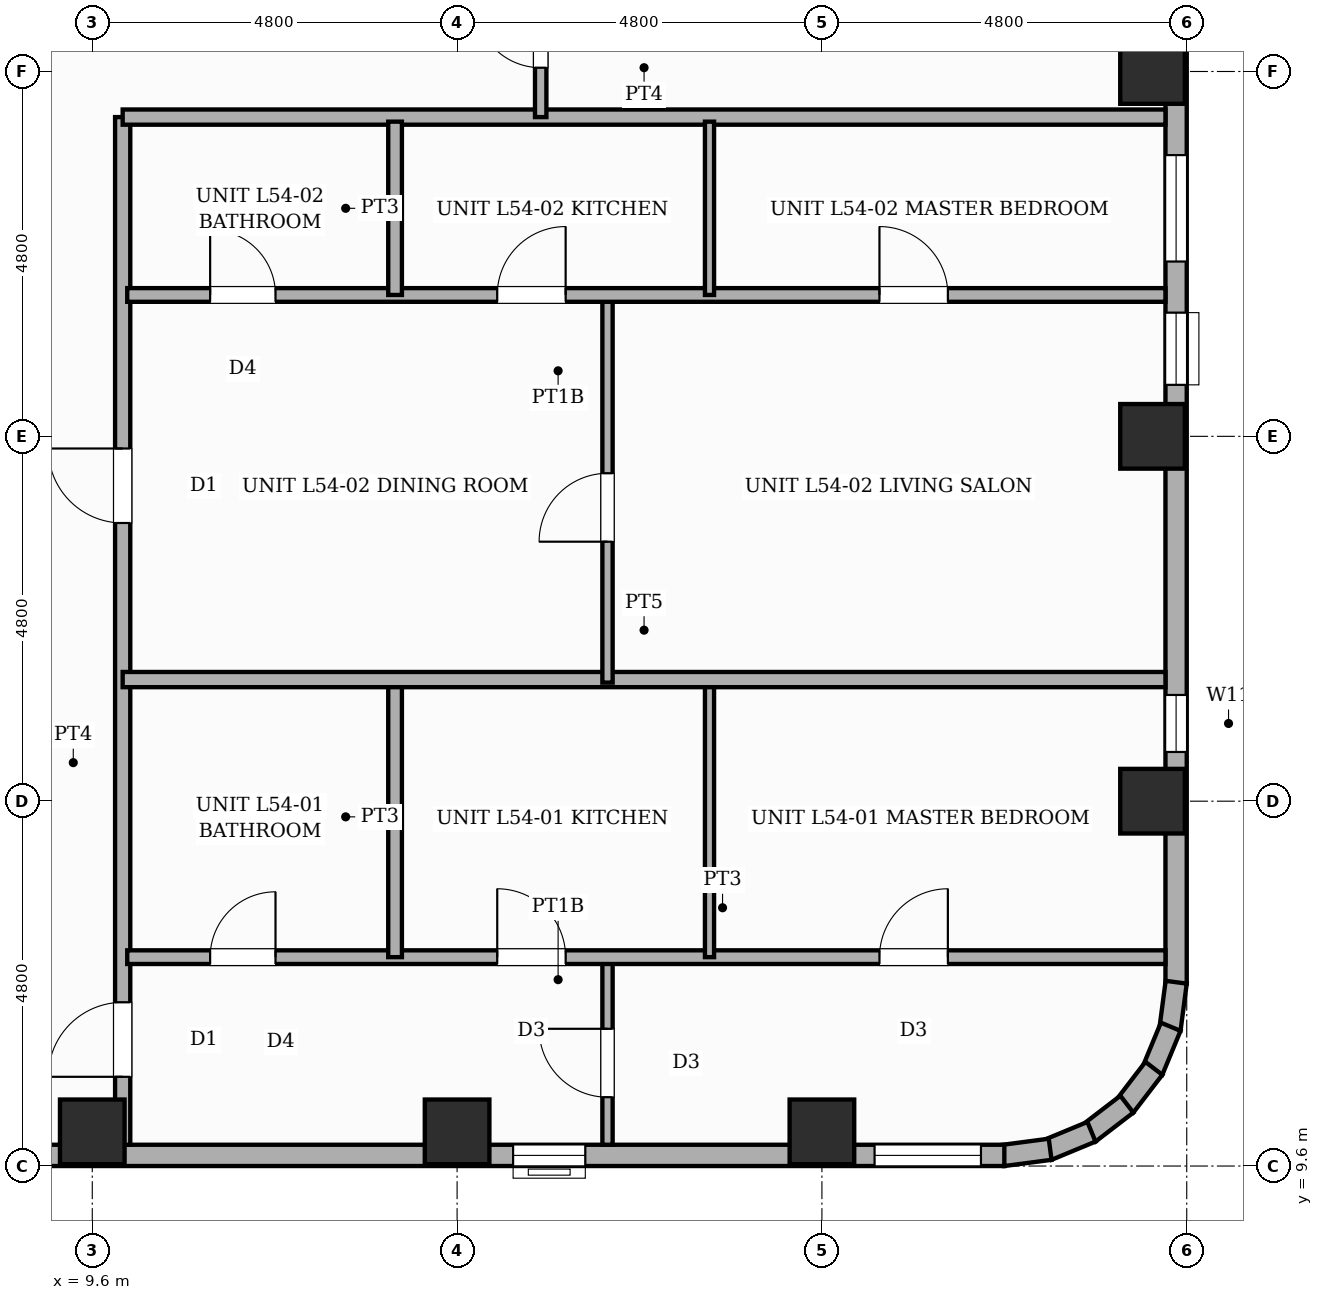
"""IFC4 building model, lengths in metres.
Left out: names, types, materials, properties, quantities, classifications, styles, units other than length and angle.
Written with IfcOpenShell. Run it as: python <this file> out.ifc"""

import sys

from ifc_helpers import new_model, si_unit, direction, frame, frame_2d, origin, origin_2d, place, context, subcontext, project, spatial, rectangle, extrude, element, fill, save


model = new_model("IFC4")
c1 = context("Model", 3, precision=1e-05, world=origin(), true_north=direction((0.0, 1.0)))
c2 = subcontext(c1, "Body", "Model", "MODEL_VIEW")
j1 = project(units=[si_unit("LENGTHUNIT", "METRE"), si_unit("PLANEANGLEUNIT", "RADIAN")], contexts=[c1])
p1 = place(None, origin())
s1 = spatial("IfcSite", under=j1, at=p1, CompositionType="ELEMENT")
p2 = place(p1, origin())
s2 = spatial("IfcBuilding", under=s1, at=p2, CompositionType="ELEMENT")
p3 = place(p2, frame((0.0, 0.0, 207.4)))
s3 = spatial("IfcBuildingStorey", under=s2, at=p3, CompositionType="ELEMENT", Elevation=207.4)
for number, where, z_axis, x_axis in (
    (1, (9.6, 10.05, 0.0), (0.0, 0.0, 1.0), (1.0, 0.0, 0.0)),
    (2, (14.4, 10.05, 0.0), (0.0, 0.0, 1.0), (1.0, 0.0, 0.0)),
    (3, (19.2, 10.05, 0.0), (0.0, 0.0, 1.0), (1.0, 0.0, 0.0)),
    (4, (23.55, 14.4, 0.0), (0.0, 0.0, 1.0), (1.0, 0.0, 0.0)),
    (5, (23.55, 19.2, 0.0), (0.0, 0.0, 1.0), (1.0, 0.0, 0.0)),
    (6, (23.55, 24.0, 0.0), (0.0, 0.0, 1.0), (1.0, 0.0, 0.0)),
):
    element("IfcColumn", number, at=place(p3, frame(where, z_axis=z_axis, x_axis=x_axis)), inside=s3, PredefinedType="COLUMN", context=c2, shape_type="SweptSolid", body=[
        extrude(rectangle(XDim=0.85, YDim=0.85, at=origin_2d()), origin(), (0.0, 0.0, 1.0), 3.6),
    ])
p4 = place(p3, frame((23.86, 26.4, 0.0), z_axis=(0.0, 0.0, 1.0), x_axis=(0.0, -1.0, 0.0)))
e7 = element("IfcWall", 7, at=p4, inside=s3, PredefinedType="STANDARD", context=c2, shape_type="SweptSolid", body=[
    extrude(rectangle(XDim=14.4, YDim=0.28, at=frame_2d((7.2, 0.0))), origin(), (0.0, 0.0, 1.0), 2.66),
])
p5 = place(p4, frame((10.603, 0.0, 0.45)))
e8 = element("IfcOpeningElement", 8, at=p5, cuts=e7, PredefinedType="OPENING", context=c2, shape_type="SweptSolid", body=[
    extrude(rectangle(XDim=0.75, YDim=1.8, at=frame_2d((0.375, 0.9))), frame((0.0, 0.15, 0.0), z_axis=(0.0, -1.0, 0.0), x_axis=(1.0, 0.0, 0.0)), (0.0, 0.0, 1.0), 0.3),
])
p6 = place(p4, frame((3.5, 0.0, 0.65)))
e9 = element("IfcOpeningElement", 9, at=p6, cuts=e7, PredefinedType="OPENING", context=c2, shape_type="SweptSolid", body=[
    extrude(rectangle(XDim=1.4, YDim=1.1, at=frame_2d((0.7, 0.55))), frame((0.0, 0.15, 0.0), z_axis=(0.0, -1.0, 0.0), x_axis=(1.0, 0.0, 0.0)), (0.0, 0.0, 1.0), 0.3),
])
p7 = place(p4, frame((5.573, 0.0, 0.45)))
e10 = element("IfcOpeningElement", 10, at=p7, cuts=e7, PredefinedType="OPENING", context=c2, shape_type="SweptSolid", body=[
    extrude(rectangle(XDim=0.95, YDim=1.8, at=frame_2d((0.475, 0.9))), frame((0.0, 0.15, 0.0), z_axis=(0.0, -1.0, 0.0), x_axis=(1.0, 0.0, 0.0)), (0.0, 0.0, 1.0), 0.3),
])
p8 = place(p4, frame((0.933, 0.0, 0.45)))
e11 = element("IfcOpeningElement", 11, at=p8, cuts=e7, PredefinedType="OPENING", context=c2, shape_type="SweptSolid", body=[
    extrude(rectangle(XDim=0.75, YDim=1.8, at=frame_2d((0.375, 0.9))), frame((0.0, 0.15, 0.0), z_axis=(0.0, -1.0, 0.0), x_axis=(1.0, 0.0, 0.0)), (0.0, 0.0, 1.0), 0.3),
])
for number, where, z_axis, x_axis in (
    (12, (23.861, 12.018, 0.0), (0.0, 0.0, 1.0), (-0.131, -0.991, 0.0)),
    (13, (23.789, 11.432, 0.0), (0.0, 0.0, 1.0), (-0.382, -0.924, 0.0)),
    (14, (23.567, 10.885, 0.0), (0.0, 0.0, 1.0), (-0.609, -0.793, 0.0)),
    (15, (23.212, 10.414, 0.0), (0.0, 0.0, 1.0), (-0.793, -0.609, 0.0)),
    (16, (22.746, 10.051, 0.0), (0.0, 0.0, 1.0), (-0.924, -0.383, 0.0)),
    (17, (22.203, 9.821, 0.0), (0.0, 0.0, 1.0), (-0.991, -0.131, 0.0)),
):
    element("IfcWall", number, at=place(p3, frame(where, z_axis=z_axis, x_axis=x_axis)), inside=s3, PredefinedType="STANDARD", context=c2, shape_type="SweptSolid", body=[
        extrude(rectangle(XDim=0.626, YDim=0.28, at=frame_2d((0.313, 0.0))), origin(), (0.0, 0.0, 1.0), 3.38),
    ])
p9 = place(p3, frame((21.6, 9.74, 0.0), z_axis=(0.0, 0.0, 1.0), x_axis=(-1.0, 0.0, 0.0)))
e18 = element("IfcWall", 18, at=p9, inside=s3, PredefinedType="STANDARD", context=c2, shape_type="SweptSolid", body=[
    extrude(rectangle(XDim=14.4, YDim=0.28, at=frame_2d((7.2, 0.0))), origin(), (0.0, 0.0, 1.0), 2.66),
])
p10 = place(p9, frame((12.647, 0.0, 0.45)))
e19 = element("IfcOpeningElement", 19, at=p10, cuts=e18, PredefinedType="OPENING", context=c2, shape_type="SweptSolid", body=[
    extrude(rectangle(XDim=0.6, YDim=1.8, at=frame_2d((0.3, 0.9))), frame((0.0, 0.15, 0.0), z_axis=(0.0, -1.0, 0.0), x_axis=(1.0, 0.0, 0.0)), (0.0, 0.0, 1.0), 0.3),
])
p11 = place(p9, frame((5.513, 0.0, 0.45)))
e20 = element("IfcOpeningElement", 20, at=p11, cuts=e18, PredefinedType="OPENING", context=c2, shape_type="SweptSolid", body=[
    extrude(rectangle(XDim=0.95, YDim=1.8, at=frame_2d((0.475, 0.9))), frame((0.0, 0.15, 0.0), z_axis=(0.0, -1.0, 0.0), x_axis=(1.0, 0.0, 0.0)), (0.0, 0.0, 1.0), 0.3),
])
p12 = place(p9, frame((0.308, 0.0, 0.65)))
e21 = element("IfcOpeningElement", 21, at=p12, cuts=e18, PredefinedType="OPENING", context=c2, shape_type="SweptSolid", body=[
    extrude(rectangle(XDim=1.4, YDim=1.1, at=frame_2d((0.7, 0.55))), frame((0.0, 0.15, 0.0), z_axis=(0.0, -1.0, 0.0), x_axis=(1.0, 0.0, 0.0)), (0.0, 0.0, 1.0), 0.3),
])
p13 = place(p3, frame((10.0, 9.88, 0.0), z_axis=(0.0, 0.0, 1.0), x_axis=(0.0, 1.0, 0.0)))
e22 = element("IfcWall", 22, at=p13, inside=s3, PredefinedType="PARTITIONING", context=c2, shape_type="SweptSolid", body=[
    extrude(rectangle(XDim=13.52, YDim=0.2, at=frame_2d((6.76, 0.0))), origin(), (0.0, 0.0, 1.0), 3.38),
])
p14 = place(p13, frame((0.894, 0.0, 0.0)))
e23 = element("IfcOpeningElement", 23, at=p14, cuts=e22, PredefinedType="OPENING", context=c2, shape_type="SweptSolid", body=[
    extrude(rectangle(XDim=0.98, YDim=2.18, at=frame_2d((0.49, 1.09))), frame((0.0, 0.11, 0.0), z_axis=(0.0, -1.0, 0.0), x_axis=(1.0, 0.0, 0.0)), (0.0, 0.0, 1.0), 0.22),
])
p15 = place(p13, frame((8.18, 0.0, 0.0)))
e24 = element("IfcOpeningElement", 24, at=p15, cuts=e22, PredefinedType="OPENING", context=c2, shape_type="SweptSolid", body=[
    extrude(rectangle(XDim=0.98, YDim=2.18, at=frame_2d((0.49, 1.09))), frame((0.0, 0.11, 0.0), z_axis=(0.0, -1.0, 0.0), x_axis=(1.0, 0.0, 0.0)), (0.0, 0.0, 1.0), 0.22),
])
p16 = place(p3, frame((10.0, 23.4, 0.0), z_axis=(0.0, 0.0, 1.0), x_axis=(1.0, 0.0, 0.0)))
e25 = element("IfcWall", 25, at=p16, inside=s3, PredefinedType="PARTITIONING", context=c2, shape_type="SweptSolid", body=[
    extrude(rectangle(XDim=13.72, YDim=0.2, at=frame_2d((6.86, 0.0))), origin(), (0.0, 0.0, 1.0), 3.38),
])
p17 = place(p3, frame((15.5, 23.4, 0.0), z_axis=(0.0, 0.0, 1.0), x_axis=(0.0, 1.0, 0.0)))
e26 = element("IfcWall", 26, at=p17, inside=s3, PredefinedType="PARTITIONING", context=c2, shape_type="SweptSolid", body=[
    extrude(rectangle(XDim=2.35, YDim=0.15, at=frame_2d((1.175, 0.0))), origin(), (0.0, 0.0, 1.0), 3.38),
])
p18 = place(p17, frame((0.65, 0.0, 0.0)))
e27 = element("IfcOpeningElement", 27, at=p18, cuts=e26, PredefinedType="OPENING", context=c2, shape_type="SweptSolid", body=[
    extrude(rectangle(XDim=0.86, YDim=2.1, at=frame_2d((0.43, 1.05))), frame((0.0, 0.085, 0.0), z_axis=(0.0, -1.0, 0.0), x_axis=(1.0, 0.0, 0.0)), (0.0, 0.0, 1.0), 0.17),
])
p19 = place(p3, frame((16.379, 9.88, 0.0), z_axis=(0.0, 0.0, 1.0), x_axis=(0.0, 1.0, 0.0)))
e28 = element("IfcWall", 28, at=p19, inside=s3, PredefinedType="PARTITIONING", context=c2, shape_type="SweptSolid", body=[
    extrude(rectangle(XDim=2.468, YDim=0.135, at=frame_2d((1.234, 0.0))), origin(), (0.0, 0.0, 1.0), 3.38),
])
p20 = place(p19, frame((0.625, 0.0, 0.0)))
e29 = element("IfcOpeningElement", 29, at=p20, cuts=e28, PredefinedType="OPENING", context=c2, shape_type="SweptSolid", body=[
    extrude(rectangle(XDim=0.9, YDim=2.15, at=frame_2d((0.45, 1.075))), frame((0.0, 0.078, 0.0), z_axis=(0.0, -1.0, 0.0), x_axis=(1.0, 0.0, 0.0)), (0.0, 0.0, 1.0), 0.155),
])
p21 = place(p3, frame((10.06, 12.348, 0.0), z_axis=(0.0, 0.0, 1.0), x_axis=(1.0, 0.0, 0.0)))
e30 = element("IfcWall", 30, at=p21, inside=s3, PredefinedType="PLUMBINGWALL", context=c2, shape_type="SweptSolid", body=[
    extrude(rectangle(XDim=13.66, YDim=0.18, at=frame_2d((6.83, 0.0))), origin(), (0.0, 0.0, 1.0), 3.38),
])
p22 = place(p21, frame((1.091, 0.0, 0.0)))
e31 = element("IfcOpeningElement", 31, at=p22, cuts=e30, PredefinedType="OPENING", context=c2, shape_type="SweptSolid", body=[
    extrude(rectangle(XDim=0.86, YDim=2.1, at=frame_2d((0.43, 1.05))), frame((0.0, 0.1, 0.0), z_axis=(0.0, -1.0, 0.0), x_axis=(1.0, 0.0, 0.0)), (0.0, 0.0, 1.0), 0.2),
])
p23 = place(p21, frame((4.868, 0.0, 0.0)))
e32 = element("IfcOpeningElement", 32, at=p23, cuts=e30, PredefinedType="OPENING", context=c2, shape_type="SweptSolid", body=[
    extrude(rectangle(XDim=0.9, YDim=2.15, at=frame_2d((0.45, 1.075))), frame((0.0, 0.1, 0.0), z_axis=(0.0, -1.0, 0.0), x_axis=(1.0, 0.0, 0.0)), (0.0, 0.0, 1.0), 0.2),
])
p24 = place(p21, frame((9.897, 0.0, 0.0)))
e33 = element("IfcOpeningElement", 33, at=p24, cuts=e30, PredefinedType="OPENING", context=c2, shape_type="SweptSolid", body=[
    extrude(rectangle(XDim=0.9, YDim=2.15, at=frame_2d((0.45, 1.075))), frame((0.0, 0.1, 0.0), z_axis=(0.0, -1.0, 0.0), x_axis=(1.0, 0.0, 0.0)), (0.0, 0.0, 1.0), 0.2),
])
p25 = place(p3, frame((13.584, 12.348, 0.0), z_axis=(0.0, 0.0, 1.0), x_axis=(0.0, 1.0, 0.0)))
e34 = element("IfcWall", 34, at=p25, inside=s3, PredefinedType="PLUMBINGWALL", context=c2, shape_type="SweptSolid", body=[
    extrude(rectangle(XDim=3.692, YDim=0.18, at=frame_2d((1.846, 0.0))), origin(), (0.0, 0.0, 1.0), 3.38),
])
p26 = place(p3, frame((17.721, 12.348, 0.0), z_axis=(0.0, 0.0, 1.0), x_axis=(0.0, 1.0, 0.0)))
e35 = element("IfcWall", 35, at=p26, inside=s3, PredefinedType="PARTITIONING", context=c2, shape_type="SweptSolid", body=[
    extrude(rectangle(XDim=3.692, YDim=0.12, at=frame_2d((1.846, 0.0))), origin(), (0.0, 0.0, 1.0), 3.38),
])
p27 = place(p3, frame((10.0, 16.0, 0.0), z_axis=(0.0, 0.0, 1.0), x_axis=(1.0, 0.0, 0.0)))
e36 = element("IfcWall", 36, at=p27, inside=s3, PredefinedType="SOLIDWALL", context=c2, shape_type="SweptSolid", body=[
    extrude(rectangle(XDim=13.72, YDim=0.2, at=frame_2d((6.86, 0.0))), origin(), (0.0, 0.0, 1.0), 3.38),
])
p28 = place(p3, frame((16.379, 15.96, 0.0), z_axis=(0.0, 0.0, 1.0), x_axis=(0.0, 1.0, 0.0)))
e37 = element("IfcWall", 37, at=p28, inside=s3, PredefinedType="PARTITIONING", context=c2, shape_type="SweptSolid", body=[
    extrude(rectangle(XDim=5.1, YDim=0.135, at=frame_2d((2.55, 0.0))), origin(), (0.0, 0.0, 1.0), 3.38),
])
p29 = place(p28, frame((1.854, 0.0, 0.0)))
e38 = element("IfcOpeningElement", 38, at=p29, cuts=e37, PredefinedType="OPENING", context=c2, shape_type="SweptSolid", body=[
    extrude(rectangle(XDim=0.9, YDim=2.15, at=frame_2d((0.45, 1.075))), frame((0.0, 0.078, 0.0), z_axis=(0.0, -1.0, 0.0), x_axis=(1.0, 0.0, 0.0)), (0.0, 0.0, 1.0), 0.155),
])
p30 = place(p3, frame((10.06, 21.06, 0.0), z_axis=(0.0, 0.0, 1.0), x_axis=(1.0, 0.0, 0.0)))
e39 = element("IfcWall", 39, at=p30, inside=s3, PredefinedType="PLUMBINGWALL", context=c2, shape_type="SweptSolid", body=[
    extrude(rectangle(XDim=13.66, YDim=0.18, at=frame_2d((6.83, 0.0))), origin(), (0.0, 0.0, 1.0), 3.38),
])
p31 = place(p30, frame((1.091, 0.0, 0.0)))
e40 = element("IfcOpeningElement", 40, at=p31, cuts=e39, PredefinedType="OPENING", context=c2, shape_type="SweptSolid", body=[
    extrude(rectangle(XDim=0.86, YDim=2.1, at=frame_2d((0.43, 1.05))), frame((0.0, 0.1, 0.0), z_axis=(0.0, -1.0, 0.0), x_axis=(1.0, 0.0, 0.0)), (0.0, 0.0, 1.0), 0.2),
])
p32 = place(p30, frame((4.868, 0.0, 0.0)))
e41 = element("IfcOpeningElement", 41, at=p32, cuts=e39, PredefinedType="OPENING", context=c2, shape_type="SweptSolid", body=[
    extrude(rectangle(XDim=0.9, YDim=2.15, at=frame_2d((0.45, 1.075))), frame((0.0, 0.1, 0.0), z_axis=(0.0, -1.0, 0.0), x_axis=(1.0, 0.0, 0.0)), (0.0, 0.0, 1.0), 0.2),
])
p33 = place(p30, frame((9.897, 0.0, 0.0)))
e42 = element("IfcOpeningElement", 42, at=p33, cuts=e39, PredefinedType="OPENING", context=c2, shape_type="SweptSolid", body=[
    extrude(rectangle(XDim=0.9, YDim=2.15, at=frame_2d((0.45, 1.075))), frame((0.0, 0.1, 0.0), z_axis=(0.0, -1.0, 0.0), x_axis=(1.0, 0.0, 0.0)), (0.0, 0.0, 1.0), 0.2),
])
p34 = place(p3, frame((13.584, 21.06, 0.0), z_axis=(0.0, 0.0, 1.0), x_axis=(0.0, 1.0, 0.0)))
e43 = element("IfcWall", 43, at=p34, inside=s3, PredefinedType="PLUMBINGWALL", context=c2, shape_type="SweptSolid", body=[
    extrude(rectangle(XDim=2.28, YDim=0.18, at=frame_2d((1.14, 0.0))), origin(), (0.0, 0.0, 1.0), 3.38),
])
p35 = place(p3, frame((17.721, 21.06, 0.0), z_axis=(0.0, 0.0, 1.0), x_axis=(0.0, 1.0, 0.0)))
e44 = element("IfcWall", 44, at=p35, inside=s3, PredefinedType="PARTITIONING", context=c2, shape_type="SweptSolid", body=[
    extrude(rectangle(XDim=2.28, YDim=0.12, at=frame_2d((1.14, 0.0))), origin(), (0.0, 0.0, 1.0), 3.38),
])
p36 = place(p5, origin())
e45 = element("IfcWindow", 45, at=p36, inside=s3, PartitioningType="SINGLE_PANEL", PredefinedType="WINDOW", context=c2, shape_type="SweptSolid", body=[
    extrude(rectangle(XDim=0.75, YDim=1.8, at=frame_2d((0.375, 0.9))), frame((0.0, 0.03, 0.0), z_axis=(0.0, -1.0, 0.0), x_axis=(1.0, 0.0, 0.0)), (0.0, 0.0, 1.0), 0.06),
])
fill(e8, e45)
p37 = place(p6, origin())
e46 = element("IfcWindow", 46, at=p37, inside=s3, PartitioningType="SINGLE_PANEL", PredefinedType="WINDOW", context=c2, shape_type="SweptSolid", body=[
    extrude(rectangle(XDim=1.4, YDim=1.1, at=frame_2d((0.7, 0.55))), frame((0.0, 0.03, 0.0), z_axis=(0.0, -1.0, 0.0), x_axis=(1.0, 0.0, 0.0)), (0.0, 0.0, 1.0), 0.06),
])
fill(e9, e46)
p38 = place(p7, origin())
e47 = element("IfcWindow", 47, at=p38, inside=s3, PartitioningType="SINGLE_PANEL", PredefinedType="WINDOW", context=c2, shape_type="SweptSolid", body=[
    extrude(rectangle(XDim=0.95, YDim=1.8, at=frame_2d((0.475, 0.9))), frame((0.0, 0.03, 0.0), z_axis=(0.0, -1.0, 0.0), x_axis=(1.0, 0.0, 0.0)), (0.0, 0.0, 1.0), 0.06),
])
fill(e10, e47)
p39 = place(p11, origin())
e48 = element("IfcWindow", 48, at=p39, inside=s3, PartitioningType="SINGLE_PANEL", PredefinedType="WINDOW", context=c2, shape_type="SweptSolid", body=[
    extrude(rectangle(XDim=0.95, YDim=1.8, at=frame_2d((0.475, 0.9))), frame((0.0, 0.03, 0.0), z_axis=(0.0, -1.0, 0.0), x_axis=(1.0, 0.0, 0.0)), (0.0, 0.0, 1.0), 0.06),
])
fill(e20, e48)
p40 = place(p12, origin())
e49 = element("IfcWindow", 49, at=p40, inside=s3, PartitioningType="SINGLE_PANEL", PredefinedType="WINDOW", context=c2, shape_type="SweptSolid", body=[
    extrude(rectangle(XDim=1.4, YDim=1.1, at=frame_2d((0.7, 0.55))), frame((0.0, 0.03, 0.0), z_axis=(0.0, -1.0, 0.0), x_axis=(1.0, 0.0, 0.0)), (0.0, 0.0, 1.0), 0.06),
])
fill(e21, e49)
p41 = place(p18, origin())
e50 = element("IfcDoor", 50, at=p41, inside=s3, OperationType="SINGLE_SWING_RIGHT", PredefinedType="DOOR", context=c2, shape_type="SweptSolid", body=[
    extrude(rectangle(XDim=0.86, YDim=2.1, at=frame_2d((0.43, 1.05))), frame((0.0, 0.025, 0.0), z_axis=(0.0, -1.0, 0.0), x_axis=(1.0, 0.0, 0.0)), (0.0, 0.0, 1.0), 0.05),
])
fill(e27, e50)
p42 = place(p14, origin())
e51 = element("IfcDoor", 51, at=p42, inside=s3, OperationType="SINGLE_SWING_LEFT", PredefinedType="DOOR", context=c2, shape_type="SweptSolid", body=[
    extrude(rectangle(XDim=0.98, YDim=2.18, at=frame_2d((0.49, 1.09))), frame((0.0, 0.025, 0.0), z_axis=(0.0, -1.0, 0.0), x_axis=(1.0, 0.0, 0.0)), (0.0, 0.0, 1.0), 0.05),
])
fill(e23, e51)
p43 = place(p20, origin())
e52 = element("IfcDoor", 52, at=p43, inside=s3, OperationType="SINGLE_SWING_RIGHT", PredefinedType="DOOR", context=c2, shape_type="SweptSolid", body=[
    extrude(rectangle(XDim=0.9, YDim=2.15, at=frame_2d((0.45, 1.075))), frame((0.0, 0.025, 0.0), z_axis=(0.0, -1.0, 0.0), x_axis=(1.0, 0.0, 0.0)), (0.0, 0.0, 1.0), 0.05),
])
fill(e29, e52)
p44 = place(p22, origin())
e53 = element("IfcDoor", 53, at=p44, inside=s3, OperationType="SINGLE_SWING_RIGHT", PredefinedType="DOOR", context=c2, shape_type="SweptSolid", body=[
    extrude(rectangle(XDim=0.86, YDim=2.1, at=frame_2d((0.43, 1.05))), frame((0.0, 0.025, 0.0), z_axis=(0.0, -1.0, 0.0), x_axis=(1.0, 0.0, 0.0)), (0.0, 0.0, 1.0), 0.05),
])
fill(e31, e53)
p45 = place(p23, origin())
e54 = element("IfcDoor", 54, at=p45, inside=s3, OperationType="SINGLE_SWING_LEFT", PredefinedType="DOOR", context=c2, shape_type="SweptSolid", body=[
    extrude(rectangle(XDim=0.9, YDim=2.15, at=frame_2d((0.45, 1.075))), frame((0.0, 0.025, 0.0), z_axis=(0.0, -1.0, 0.0), x_axis=(1.0, 0.0, 0.0)), (0.0, 0.0, 1.0), 0.05),
])
fill(e32, e54)
p46 = place(p24, origin())
e55 = element("IfcDoor", 55, at=p46, inside=s3, OperationType="SINGLE_SWING_RIGHT", PredefinedType="DOOR", context=c2, shape_type="SweptSolid", body=[
    extrude(rectangle(XDim=0.9, YDim=2.15, at=frame_2d((0.45, 1.075))), frame((0.0, 0.025, 0.0), z_axis=(0.0, -1.0, 0.0), x_axis=(1.0, 0.0, 0.0)), (0.0, 0.0, 1.0), 0.05),
])
fill(e33, e55)
p47 = place(p15, origin())
e56 = element("IfcDoor", 56, at=p47, inside=s3, OperationType="SINGLE_SWING_RIGHT", PredefinedType="DOOR", context=c2, shape_type="SweptSolid", body=[
    extrude(rectangle(XDim=0.98, YDim=2.18, at=frame_2d((0.49, 1.09))), frame((0.0, 0.025, 0.0), z_axis=(0.0, -1.0, 0.0), x_axis=(1.0, 0.0, 0.0)), (0.0, 0.0, 1.0), 0.05),
])
fill(e24, e56)
p48 = place(p29, origin())
e57 = element("IfcDoor", 57, at=p48, inside=s3, OperationType="SINGLE_SWING_LEFT", PredefinedType="DOOR", context=c2, shape_type="SweptSolid", body=[
    extrude(rectangle(XDim=0.9, YDim=2.15, at=frame_2d((0.45, 1.075))), frame((0.0, 0.025, 0.0), z_axis=(0.0, -1.0, 0.0), x_axis=(1.0, 0.0, 0.0)), (0.0, 0.0, 1.0), 0.05),
])
fill(e38, e57)
p49 = place(p31, origin())
e58 = element("IfcDoor", 58, at=p49, inside=s3, OperationType="SINGLE_SWING_LEFT", PredefinedType="DOOR", context=c2, shape_type="SweptSolid", body=[
    extrude(rectangle(XDim=0.86, YDim=2.1, at=frame_2d((0.43, 1.05))), frame((0.0, 0.025, 0.0), z_axis=(0.0, -1.0, 0.0), x_axis=(1.0, 0.0, 0.0)), (0.0, 0.0, 1.0), 0.05),
])
fill(e40, e58)
p50 = place(p32, origin())
e59 = element("IfcDoor", 59, at=p50, inside=s3, OperationType="SINGLE_SWING_RIGHT", PredefinedType="DOOR", context=c2, shape_type="SweptSolid", body=[
    extrude(rectangle(XDim=0.9, YDim=2.15, at=frame_2d((0.45, 1.075))), frame((0.0, 0.025, 0.0), z_axis=(0.0, -1.0, 0.0), x_axis=(1.0, 0.0, 0.0)), (0.0, 0.0, 1.0), 0.05),
])
fill(e41, e59)
p51 = place(p33, origin())
e60 = element("IfcDoor", 60, at=p51, inside=s3, OperationType="SINGLE_SWING_LEFT", PredefinedType="DOOR", context=c2, shape_type="SweptSolid", body=[
    extrude(rectangle(XDim=0.9, YDim=2.15, at=frame_2d((0.45, 1.075))), frame((0.0, 0.025, 0.0), z_axis=(0.0, -1.0, 0.0), x_axis=(1.0, 0.0, 0.0)), (0.0, 0.0, 1.0), 0.05),
])
fill(e42, e60)
save(model, sys.argv[1])
